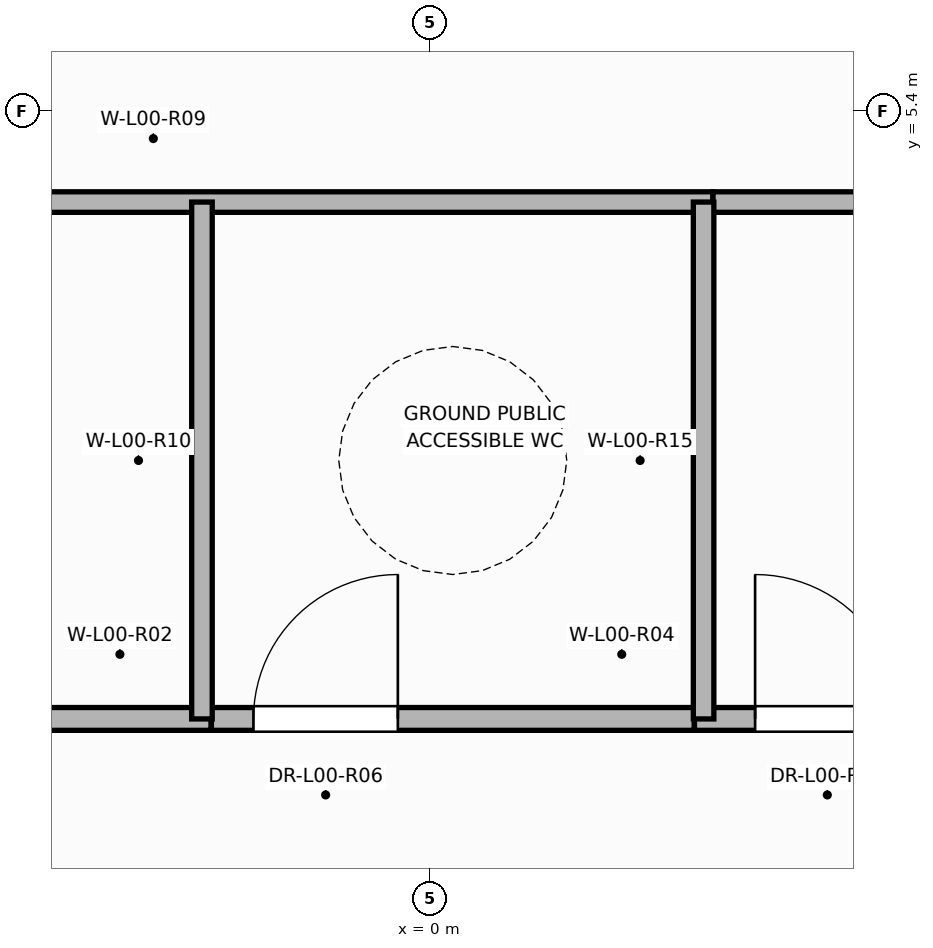
"""IFC4 building model, lengths in metres.
Left out: names, types, materials, properties, quantities, classifications, styles, units other than length and angle.
Written with IfcOpenShell. Run it as: python <this file> out.ifc"""

import sys

from ifc_helpers import new_model, si_unit, direction, frame, frame_2d, origin, place, context, subcontext, project, spatial, rectangle, extrude, element, fill, save


model = new_model("IFC4")
c1 = context("Model", 3, precision=1e-05, world=origin(), true_north=direction((0.0, 1.0)))
c2 = subcontext(c1, "Body", "Model", "MODEL_VIEW")
j1 = project(units=[si_unit("LENGTHUNIT", "METRE"), si_unit("PLANEANGLEUNIT", "RADIAN")], contexts=[c1])
p1 = place(None, origin())
s1 = spatial("IfcSite", under=j1, at=p1, CompositionType="ELEMENT")
p2 = place(p1, origin())
s2 = spatial("IfcBuilding", under=s1, at=p2, CompositionType="ELEMENT")
p3 = place(p2, origin())
s3 = spatial("IfcBuildingStorey", under=s2, at=p3, CompositionType="ELEMENT", Elevation=0.0)
p4 = place(p3, frame((-5.438, 1.4, 0.0), z_axis=(0.0, 0.0, 1.0), x_axis=(1.0, 0.0, 0.0)))
e1 = element("IfcWall", 1, at=p4, inside=s3, PredefinedType="PARTITIONING", context=c2, shape_type="SweptSolid", body=[
    extrude(rectangle(XDim=3.998, YDim=0.15, at=frame_2d((1.999, 0.0))), origin(), (0.0, 0.0, 1.0), 5.12),
])
p5 = place(p4, frame((0.275, 0.0, 0.0)))
e2 = element("IfcOpeningElement", 2, at=p5, cuts=e1, PredefinedType="OPENING", context=c2, shape_type="SweptSolid", body=[
    extrude(rectangle(XDim=0.956, YDim=2.104, at=frame_2d((0.475, 1.052))), frame((0.0, 0.085, 0.0), z_axis=(0.0, -1.0, 0.0), x_axis=(1.0, 0.0, 0.0)), (0.0, 0.0, 1.0), 0.17),
])
p6 = place(p3, frame((-5.5, 4.8, 0.0), z_axis=(0.0, 0.0, 1.0), x_axis=(1.0, 0.0, 0.0)))
e3 = element("IfcWall", 3, at=p6, inside=s3, PredefinedType="PARTITIONING", context=c2, shape_type="SweptSolid", body=[
    extrude(rectangle(XDim=7.36, YDim=0.135, at=frame_2d((3.68, 0.0))), origin(), (0.0, 0.0, 1.0), 5.12),
])
p7 = place(p3, frame((1.74, 1.4, 0.0), z_axis=(0.0, 0.0, 1.0), x_axis=(1.0, 0.0, 0.0)))
e4 = element("IfcWall", 4, at=p7, inside=s3, PredefinedType="PARTITIONING", context=c2, shape_type="SweptSolid", body=[
    extrude(rectangle(XDim=3.698, YDim=0.15, at=frame_2d((1.849, 0.0))), origin(), (0.0, 0.0, 1.0), 5.12),
])
p8 = place(p7, frame((0.399, 0.0, 0.0)))
e5 = element("IfcOpeningElement", 5, at=p8, cuts=e4, PredefinedType="OPENING", context=c2, shape_type="SweptSolid", body=[
    extrude(rectangle(XDim=0.956, YDim=2.104, at=frame_2d((0.475, 1.052))), frame((0.0, 0.085, 0.0), z_axis=(0.0, -1.0, 0.0), x_axis=(1.0, 0.0, 0.0)), (0.0, 0.0, 1.0), 0.17),
])
p9 = place(p3, frame((1.862, 4.8, 0.0), z_axis=(0.0, 0.0, 1.0), x_axis=(1.0, 0.0, 0.0)))
e6 = element("IfcWall", 6, at=p9, inside=s3, PredefinedType="PARTITIONING", context=c2, shape_type="SweptSolid", body=[
    extrude(rectangle(XDim=3.638, YDim=0.135, at=frame_2d((1.819, 0.0))), origin(), (0.0, 0.0, 1.0), 5.12),
])
p10 = place(p3, frame((-1.438, 1.4, 0.0), z_axis=(0.0, 0.0, 1.0), x_axis=(1.0, 0.0, 0.0)))
e7 = element("IfcWall", 7, at=p10, inside=s3, PredefinedType="PARTITIONING", context=c2, shape_type="SweptSolid", body=[
    extrude(rectangle(XDim=3.176, YDim=0.15, at=frame_2d((1.588, 0.0))), origin(), (0.0, 0.0, 1.0), 5.12),
])
p11 = place(p10, frame((0.277, 0.0, 0.0)))
e8 = element("IfcOpeningElement", 8, at=p11, cuts=e7, PredefinedType="OPENING", context=c2, shape_type="SweptSolid", body=[
    extrude(rectangle(XDim=0.956, YDim=2.104, at=frame_2d((0.475, 1.052))), frame((0.0, 0.085, 0.0), z_axis=(0.0, -1.0, 0.0), x_axis=(1.0, 0.0, 0.0)), (0.0, 0.0, 1.0), 0.17),
])
for number, where, z_axis, x_axis in (
    (9, (-1.5, 1.4, 0.0), (0.0, 0.0, 1.0), (0.0, 1.0, 0.0)),
    (10, (1.8, 1.4, 0.0), (0.0, 0.0, 1.0), (0.0, 1.0, 0.0)),
):
    element("IfcWall", number, at=place(p3, frame(where, z_axis=z_axis, x_axis=x_axis)), inside=s3, PredefinedType="PARTITIONING", context=c2, shape_type="SweptSolid", body=[
        extrude(rectangle(XDim=3.4, YDim=0.135, at=frame_2d((1.7, 0.0))), origin(), (0.0, 0.0, 1.0), 3.895),
    ])
p12 = place(p11, origin())
e11 = element("IfcDoor", 11, at=p12, inside=s3, OperationType="SINGLE_SWING_RIGHT", PredefinedType="DOOR", context=c2, shape_type="SweptSolid", body=[
    extrude(rectangle(XDim=0.95, YDim=2.1, at=frame_2d((0.475, 1.05))), frame((0.0, 0.025, 0.0), z_axis=(0.0, -1.0, 0.0), x_axis=(1.0, 0.0, 0.0)), (0.0, 0.0, 1.0), 0.05),
])
fill(e8, e11)
p13 = place(p8, origin())
e12 = element("IfcDoor", 12, at=p13, inside=s3, OperationType="SINGLE_SWING_LEFT", PredefinedType="DOOR", context=c2, shape_type="SweptSolid", body=[
    extrude(rectangle(XDim=0.95, YDim=2.1, at=frame_2d((0.475, 1.05))), frame((0.0, 0.025, 0.0), z_axis=(0.0, -1.0, 0.0), x_axis=(1.0, 0.0, 0.0)), (0.0, 0.0, 1.0), 0.05),
])
fill(e5, e12)
save(model, sys.argv[1])
